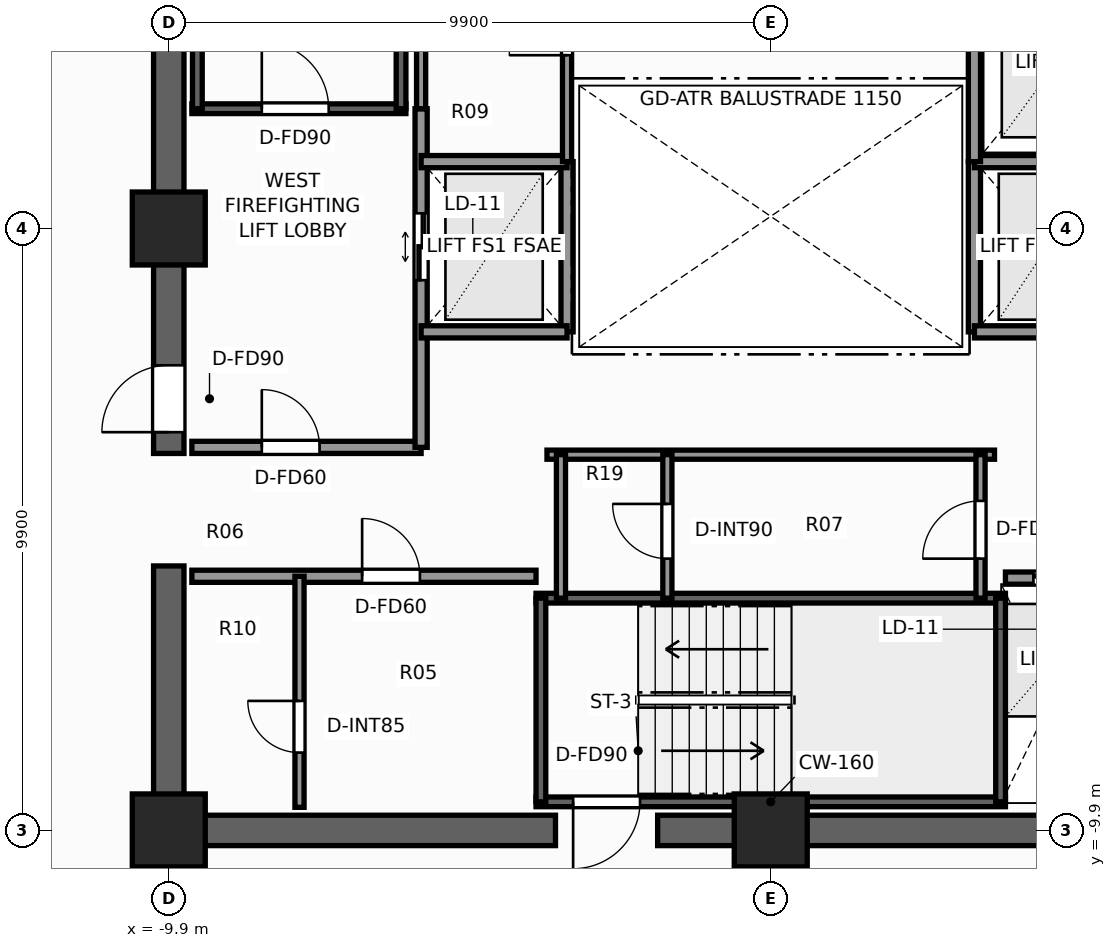
"""IFC4 building model, lengths in metres.
Left out: names, types, materials, properties, quantities, classifications, styles, units other than length and angle.
Written with IfcOpenShell. Run it as: python <this file> out.ifc"""

import sys

from ifc_helpers import new_model, si_unit, direction, frame, frame_2d, origin, origin_2d, place, context, subcontext, project, spatial, rectangle, extrude, element, fill, save


model = new_model("IFC4")
c1 = context("Model", 3, precision=1e-05, world=origin(), true_north=direction((0.0, 1.0)))
c2 = subcontext(c1, "Body", "Model", "MODEL_VIEW")
j1 = project(units=[si_unit("LENGTHUNIT", "METRE"), si_unit("PLANEANGLEUNIT", "RADIAN")], contexts=[c1])
p1 = place(None, origin())
s1 = spatial("IfcSite", under=j1, at=p1, CompositionType="ELEMENT")
p2 = place(p1, origin())
s2 = spatial("IfcBuilding", under=s1, at=p2, CompositionType="ELEMENT")
p3 = place(p2, frame((0.0, 0.0, 173.4)))
s3 = spatial("IfcBuildingStorey", under=s2, at=p3, CompositionType="ELEMENT", Elevation=173.4)
p4 = place(p3, frame((10.15, -9.9, 0.0), z_axis=(0.0, 0.0, 1.0), x_axis=(-1.0, 0.0, 0.0)))
e1 = element("IfcWall", 1, at=p4, inside=s3, PredefinedType="SHEAR", context=c2, shape_type="SweptSolid", body=[
    extrude(rectangle(XDim=12.01, YDim=0.5, at=frame_2d((6.005, 0.0))), origin(), (0.0, 0.0, 1.0), 3.3),
])
p5 = place(p3, frame((-3.54, -9.9, 0.0), z_axis=(0.0, 0.0, 1.0), x_axis=(-1.0, 0.0, 0.0)))
e2 = element("IfcWall", 2, at=p5, inside=s3, PredefinedType="SHEAR", context=c2, shape_type="SweptSolid", body=[
    extrude(rectangle(XDim=6.61, YDim=0.5, at=frame_2d((3.305, 0.0))), origin(), (0.0, 0.0, 1.0), 3.3),
])
p6 = place(p3, frame((-9.9, -9.65, 0.0), z_axis=(0.0, 0.0, 1.0), x_axis=(0.0, 1.0, 0.0)))
e3 = element("IfcWall", 3, at=p6, inside=s3, PredefinedType="SHEAR", context=c2, shape_type="SweptSolid", body=[
    extrude(rectangle(XDim=4.1, YDim=0.5, at=frame_2d((2.05, 0.0))), origin(), (0.0, 0.0, 1.0), 3.3),
])
p7 = place(p3, frame((-9.9, -3.7, 0.0), z_axis=(0.0, 0.0, 1.0), x_axis=(0.0, 1.0, 0.0)))
e4 = element("IfcWall", 4, at=p7, inside=s3, PredefinedType="SHEAR", context=c2, shape_type="SweptSolid", body=[
    extrude(rectangle(XDim=13.35, YDim=0.5, at=frame_2d((6.675, 0.0))), origin(), (0.0, 0.0, 1.0), 3.3),
])
p8 = place(p7, frame((0.35, 0.0, 0.0)))
e5 = element("IfcOpeningElement", 5, at=p8, cuts=e4, PredefinedType="OPENING", context=c2, shape_type="SweptSolid", body=[
    extrude(rectangle(XDim=1.1, YDim=2.2, at=frame_2d((0.55, 1.1))), frame((0.0, 0.26, 0.0), z_axis=(0.0, -1.0, 0.0), x_axis=(1.0, 0.0, 0.0)), (0.0, 0.0, 1.0), 0.52),
])
for number, where, z_axis, x_axis in (
    (6, (-9.9, -9.9, 0.0), (0.0, 0.0, 1.0), (1.0, 0.0, 0.0)),
    (7, (0.0, -9.9, 0.0), (0.0, 0.0, 1.0), (1.0, 0.0, 0.0)),
    (8, (-9.9, 0.0, 0.0), (0.0, 0.0, 1.0), (1.0, 0.0, 0.0)),
):
    element("IfcColumn", number, at=place(p3, frame(where, z_axis=z_axis, x_axis=x_axis)), inside=s3, PredefinedType="COLUMN", context=c2, shape_type="SweptSolid", body=[
        extrude(rectangle(XDim=1.2, YDim=1.2, at=origin_2d()), origin(), (0.0, 0.0, 1.0), 3.3),
    ])
p9 = place(p3, frame((-9.52, 1.97, 0.0), z_axis=(0.0, 0.0, 1.0), x_axis=(1.0, 0.0, 0.0)))
e9 = element("IfcWall", 9, at=p9, inside=s3, PredefinedType="SHEAR", context=c2, shape_type="SweptSolid", body=[
    extrude(rectangle(XDim=3.52, YDim=0.16, at=frame_2d((1.76, 0.0))), origin(), (0.0, 0.0, 1.0), 3.3),
])
p10 = place(p9, frame((1.15, 0.0, 0.0)))
e10 = element("IfcOpeningElement", 10, at=p10, cuts=e9, PredefinedType="OPENING", context=c2, shape_type="SweptSolid", body=[
    extrude(rectangle(XDim=1.1, YDim=2.2, at=frame_2d((0.55, 1.1))), frame((0.0, 0.09, 0.0), z_axis=(0.0, -1.0, 0.0), x_axis=(1.0, 0.0, 0.0)), (0.0, 0.0, 1.0), 0.18),
])
for number, where, z_axis, x_axis in (
    (11, (-9.43, 1.97, 0.0), (0.0, 0.0, 1.0), (0.0, 1.0, 0.0)),
    (12, (-6.08, 1.97, 0.0), (0.0, 0.0, 1.0), (0.0, 1.0, 0.0)),
):
    element("IfcWall", number, at=place(p3, frame(where, z_axis=z_axis, x_axis=x_axis)), inside=s3, PredefinedType="SHEAR", context=c2, shape_type="SweptSolid", body=[
        extrude(rectangle(XDim=7.56, YDim=0.16, at=frame_2d((3.78, 0.0))), origin(), (0.0, 0.0, 1.0), 3.3),
    ])
p11 = place(p3, frame((3.86, -9.43, 0.0), z_axis=(0.0, 0.0, 1.0), x_axis=(-1.0, 0.0, 0.0)))
e13 = element("IfcWall", 13, at=p11, inside=s3, PredefinedType="SHEAR", context=c2, shape_type="SweptSolid", body=[
    extrude(rectangle(XDim=7.72, YDim=0.16, at=frame_2d((3.86, 0.0))), origin(), (0.0, 0.0, 1.0), 3.3),
])
p12 = place(p11, frame((6.01, 0.0, 0.0)))
e14 = element("IfcOpeningElement", 14, at=p12, cuts=e13, PredefinedType="OPENING", context=c2, shape_type="SweptSolid", body=[
    extrude(rectangle(XDim=1.1, YDim=2.2, at=frame_2d((0.55, 1.1))), frame((0.0, 0.09, 0.0), z_axis=(0.0, -1.0, 0.0), x_axis=(1.0, 0.0, 0.0)), (0.0, 0.0, 1.0), 0.18),
])
p13 = place(p3, frame((-3.86, -6.08, 0.0), z_axis=(0.0, 0.0, 1.0), x_axis=(1.0, 0.0, 0.0)))
e15 = element("IfcWall", 15, at=p13, inside=s3, PredefinedType="SHEAR", context=c2, shape_type="SweptSolid", body=[
    extrude(rectangle(XDim=7.72, YDim=0.16, at=frame_2d((3.86, 0.0))), origin(), (0.0, 0.0, 1.0), 3.3),
])
for number, where, z_axis, x_axis in (
    (16, (-3.78, -9.43, 0.0), (0.0, 0.0, 1.0), (0.0, 1.0, 0.0)),
    (17, (3.78, -9.43, 0.0), (0.0, 0.0, 1.0), (0.0, 1.0, 0.0)),
):
    element("IfcWall", number, at=place(p3, frame(where, z_axis=z_axis, x_axis=x_axis)), inside=s3, PredefinedType="SHEAR", context=c2, shape_type="SweptSolid", body=[
        extrude(rectangle(XDim=3.35, YDim=0.16, at=frame_2d((1.675, 0.0))), origin(), (0.0, 0.0, 1.0), 3.3),
    ])
p14 = place(p3, frame((-9.52, -3.6, 0.0), z_axis=(0.0, 0.0, 1.0), x_axis=(1.0, 0.0, 0.0)))
e18 = element("IfcWall", 18, at=p14, inside=s3, PredefinedType="SOLIDWALL", context=c2, shape_type="SweptSolid", body=[
    extrude(rectangle(XDim=3.77, YDim=0.2, at=frame_2d((1.885, 0.0))), origin(), (0.0, 0.0, 1.0), 3.08),
])
p15 = place(p14, frame((1.15, 0.0, 0.0)))
e19 = element("IfcOpeningElement", 19, at=p15, cuts=e18, PredefinedType="OPENING", context=c2, shape_type="SweptSolid", body=[
    extrude(rectangle(XDim=0.95, YDim=2.06, at=frame_2d((0.475, 1.03))), frame((0.0, 0.11, 0.0), z_axis=(0.0, -1.0, 0.0), x_axis=(1.0, 0.0, 0.0)), (0.0, 0.0, 1.0), 0.22),
])
p16 = place(p3, frame((-5.75, -3.6, 0.0), z_axis=(0.0, 0.0, 1.0), x_axis=(0.0, 1.0, 0.0)))
e20 = element("IfcWall", 20, at=p16, inside=s3, PredefinedType="SOLIDWALL", context=c2, shape_type="SweptSolid", body=[
    extrude(rectangle(XDim=5.57, YDim=0.2, at=frame_2d((2.785, 0.0))), origin(), (0.0, 0.0, 1.0), 2.715),
])
p17 = place(p16, frame((2.75, 0.0, 0.0)))
e21 = element("IfcOpeningElement", 21, at=p17, cuts=e20, PredefinedType="OPENING", context=c2, shape_type="SweptSolid", body=[
    extrude(rectangle(XDim=1.1, YDim=2.2, at=frame_2d((0.55, 1.1))), frame((0.0, 0.11, 0.0), z_axis=(0.0, -1.0, 0.0), x_axis=(1.0, 0.0, 0.0)), (0.0, 0.0, 1.0), 0.22),
])
p18 = place(p3, frame((-3.35, -1.7, 0.0), z_axis=(0.0, 0.0, 1.0), x_axis=(0.0, 1.0, 0.0)))
e22 = element("IfcWall", 22, at=p18, inside=s3, PredefinedType="SOLIDWALL", context=c2, shape_type="SweptSolid", body=[
    extrude(rectangle(XDim=2.8, YDim=0.2, at=frame_2d((1.4, 0.0))), origin(), (0.0, 0.0, 1.0), 2.715),
])
for number, where, z_axis, x_axis in (
    (23, (-5.75, -1.7, 0.0), (0.0, 0.0, 1.0), (1.0, 0.0, 0.0)),
    (24, (-5.75, 1.1, 0.0), (0.0, 0.0, 1.0), (1.0, 0.0, 0.0)),
):
    element("IfcWall", number, at=place(p3, frame(where, z_axis=z_axis, x_axis=x_axis)), inside=s3, PredefinedType="SOLIDWALL", context=c2, shape_type="SweptSolid", body=[
        extrude(rectangle(XDim=2.4, YDim=0.2, at=frame_2d((1.2, 0.0))), origin(), (0.0, 0.0, 1.0), 3.08),
    ])
p19 = place(p3, frame((3.35, -1.7, 0.0), z_axis=(0.0, 0.0, 1.0), x_axis=(0.0, 1.0, 0.0)))
e25 = element("IfcWall", 25, at=p19, inside=s3, PredefinedType="SOLIDWALL", context=c2, shape_type="SweptSolid", body=[
    extrude(rectangle(XDim=2.8, YDim=0.2, at=frame_2d((1.4, 0.0))), origin(), (0.0, 0.0, 1.0), 2.715),
])
for number, where, z_axis, x_axis in (
    (26, (3.35, -1.7, 0.0), (0.0, 0.0, 1.0), (1.0, 0.0, 0.0)),
    (27, (3.35, 1.1, 0.0), (0.0, 0.0, 1.0), (1.0, 0.0, 0.0)),
):
    element("IfcWall", number, at=place(p3, frame(where, z_axis=z_axis, x_axis=x_axis)), inside=s3, PredefinedType="SOLIDWALL", context=c2, shape_type="SweptSolid", body=[
        extrude(rectangle(XDim=2.4, YDim=0.2, at=frame_2d((1.2, 0.0))), origin(), (0.0, 0.0, 1.0), 3.08),
    ])
p20 = place(p3, frame((3.35, 1.1, 0.0), z_axis=(0.0, 0.0, 1.0), x_axis=(0.0, 1.0, 0.0)))
e28 = element("IfcWall", 28, at=p20, inside=s3, PredefinedType="SOLIDWALL", context=c2, shape_type="SweptSolid", body=[
    extrude(rectangle(XDim=3.2, YDim=0.2, at=frame_2d((1.6, 0.0))), origin(), (0.0, 0.0, 1.0), 2.715),
])
p21 = place(p3, frame((-9.52, -5.72, 0.0), z_axis=(0.0, 0.0, 1.0), x_axis=(1.0, 0.0, 0.0)))
e29 = element("IfcWall", 29, at=p21, inside=s3, PredefinedType="SOLIDWALL", context=c2, shape_type="SweptSolid", body=[
    extrude(rectangle(XDim=5.66, YDim=0.2, at=frame_2d((2.83, 0.0))), origin(), (0.0, 0.0, 1.0), 3.08),
])
p22 = place(p21, frame((2.8, 0.0, 0.0)))
e30 = element("IfcOpeningElement", 30, at=p22, cuts=e29, PredefinedType="OPENING", context=c2, shape_type="SweptSolid", body=[
    extrude(rectangle(XDim=0.95, YDim=2.06, at=frame_2d((0.475, 1.03))), frame((0.0, 0.11, 0.0), z_axis=(0.0, -1.0, 0.0), x_axis=(1.0, 0.0, 0.0)), (0.0, 0.0, 1.0), 0.22),
])
p23 = place(p3, frame((-7.75, -9.52, 0.0), z_axis=(0.0, 0.0, 1.0), x_axis=(0.0, 1.0, 0.0)))
e31 = element("IfcWall", 31, at=p23, inside=s3, PredefinedType="PARTITIONING", context=c2, shape_type="SweptSolid", body=[
    extrude(rectangle(XDim=3.8, YDim=0.15, at=frame_2d((1.9, 0.0))), origin(), (0.0, 0.0, 1.0), 3.08),
])
p24 = place(p23, frame((0.9, 0.0, 0.0)))
e32 = element("IfcOpeningElement", 32, at=p24, cuts=e31, PredefinedType="OPENING", context=c2, shape_type="SweptSolid", body=[
    extrude(rectangle(XDim=0.85, YDim=2.03, at=frame_2d((0.425, 1.015))), frame((0.0, 0.085, 0.0), z_axis=(0.0, -1.0, 0.0), x_axis=(1.0, 0.0, 0.0)), (0.0, 0.0, 1.0), 0.17),
])
p25 = place(p3, frame((3.86, -5.75, 0.0), z_axis=(0.0, 0.0, 1.0), x_axis=(1.0, 0.0, 0.0)))
e33 = element("IfcWall", 33, at=p25, inside=s3, PredefinedType="SOLIDWALL", context=c2, shape_type="SweptSolid", body=[
    extrude(rectangle(XDim=5.66, YDim=0.2, at=frame_2d((2.83, 0.0))), origin(), (0.0, 0.0, 1.0), 3.08),
])
p26 = place(p25, frame((0.46, 0.0, 0.0)))
e34 = element("IfcOpeningElement", 34, at=p26, cuts=e33, PredefinedType="OPENING", context=c2, shape_type="SweptSolid", body=[
    extrude(rectangle(XDim=1.1, YDim=2.2, at=frame_2d((0.55, 1.1))), frame((0.0, 0.11, 0.0), z_axis=(0.0, -1.0, 0.0), x_axis=(1.0, 0.0, 0.0)), (0.0, 0.0, 1.0), 0.22),
])
p27 = place(p25, frame((2.39, 0.0, 0.0)))
e35 = element("IfcOpeningElement", 35, at=p27, cuts=e33, PredefinedType="OPENING", context=c2, shape_type="SweptSolid", body=[
    extrude(rectangle(XDim=1.1, YDim=2.2, at=frame_2d((0.55, 1.1))), frame((0.0, 0.11, 0.0), z_axis=(0.0, -1.0, 0.0), x_axis=(1.0, 0.0, 0.0)), (0.0, 0.0, 1.0), 0.22),
])
p28 = place(p25, frame((4.32, 0.0, 0.0)))
e36 = element("IfcOpeningElement", 36, at=p28, cuts=e33, PredefinedType="OPENING", context=c2, shape_type="SweptSolid", body=[
    extrude(rectangle(XDim=1.1, YDim=2.2, at=frame_2d((0.55, 1.1))), frame((0.0, 0.11, 0.0), z_axis=(0.0, -1.0, 0.0), x_axis=(1.0, 0.0, 0.0)), (0.0, 0.0, 1.0), 0.22),
])
p29 = place(p3, frame((-3.68, -3.72, 0.0), z_axis=(0.0, 0.0, 1.0), x_axis=(1.0, 0.0, 0.0)))
e37 = element("IfcWall", 37, at=p29, inside=s3, PredefinedType="PARTITIONING", context=c2, shape_type="SweptSolid", body=[
    extrude(rectangle(XDim=7.36, YDim=0.15, at=frame_2d((3.68, 0.0))), origin(), (0.0, 0.0, 1.0), 3.08),
])
p30 = place(p3, frame((3.45, -6.08, 0.0), z_axis=(0.0, 0.0, 1.0), x_axis=(0.0, 1.0, 0.0)))
e38 = element("IfcWall", 38, at=p30, inside=s3, PredefinedType="PARTITIONING", context=c2, shape_type="SweptSolid", body=[
    extrude(rectangle(XDim=2.36, YDim=0.15, at=frame_2d((1.18, 0.0))), origin(), (0.0, 0.0, 1.0), 3.08),
])
p31 = place(p30, frame((0.65, 0.0, 0.0)))
e39 = element("IfcOpeningElement", 39, at=p31, cuts=e38, PredefinedType="OPENING", context=c2, shape_type="SweptSolid", body=[
    extrude(rectangle(XDim=0.95, YDim=2.06, at=frame_2d((0.475, 1.03))), frame((0.0, 0.085, 0.0), z_axis=(0.0, -1.0, 0.0), x_axis=(1.0, 0.0, 0.0)), (0.0, 0.0, 1.0), 0.17),
])
p32 = place(p3, frame((-3.45, -6.08, 0.0), z_axis=(0.0, 0.0, 1.0), x_axis=(0.0, 1.0, 0.0)))
e40 = element("IfcWall", 40, at=p32, inside=s3, PredefinedType="PARTITIONING", context=c2, shape_type="SweptSolid", body=[
    extrude(rectangle(XDim=2.36, YDim=0.15, at=frame_2d((1.18, 0.0))), origin(), (0.0, 0.0, 1.0), 3.08),
])
p33 = place(p3, frame((-1.7, -6.08, 0.0), z_axis=(0.0, 0.0, 1.0), x_axis=(0.0, 1.0, 0.0)))
e41 = element("IfcWall", 41, at=p33, inside=s3, PredefinedType="PARTITIONING", context=c2, shape_type="SweptSolid", body=[
    extrude(rectangle(XDim=2.36, YDim=0.15, at=frame_2d((1.18, 0.0))), origin(), (0.0, 0.0, 1.0), 3.08),
])
p34 = place(p33, frame((0.65, 0.0, 0.0)))
e42 = element("IfcOpeningElement", 42, at=p34, cuts=e41, PredefinedType="OPENING", context=c2, shape_type="SweptSolid", body=[
    extrude(rectangle(XDim=0.9, YDim=2.06, at=frame_2d((0.45, 1.03))), frame((0.0, 0.085, 0.0), z_axis=(0.0, -1.0, 0.0), x_axis=(1.0, 0.0, 0.0)), (0.0, 0.0, 1.0), 0.17),
])
p35 = place(p3, frame((-3.35, 1.1, 0.0), z_axis=(0.0, 0.0, 1.0), x_axis=(0.0, 1.0, 0.0)))
e43 = element("IfcWall", 43, at=p35, inside=s3, PredefinedType="PARTITIONING", context=c2, shape_type="SweptSolid", body=[
    extrude(rectangle(XDim=3.2, YDim=0.15, at=frame_2d((1.6, 0.0))), origin(), (0.0, 0.0, 1.0), 2.715),
])
p36 = place(p35, frame((1.75, 0.0, 0.0)))
e44 = element("IfcOpeningElement", 44, at=p36, cuts=e43, PredefinedType="OPENING", context=c2, shape_type="SweptSolid", body=[
    extrude(rectangle(XDim=0.95, YDim=2.06, at=frame_2d((0.475, 1.03))), frame((0.0, 0.085, 0.0), z_axis=(0.0, -1.0, 0.0), x_axis=(1.0, 0.0, 0.0)), (0.0, 0.0, 1.0), 0.17),
])
p37 = place(p3, frame((-5.75, 1.97, 0.0), z_axis=(0.0, 0.0, 1.0), x_axis=(0.0, 1.0, 0.0)))
e45 = element("IfcWall", 45, at=p37, inside=s3, PredefinedType="PARTITIONING", context=c2, shape_type="SweptSolid", body=[
    extrude(rectangle(XDim=2.33, YDim=0.15, at=frame_2d((1.165, 0.0))), origin(), (0.0, 0.0, 1.0), 2.715),
])
p38 = place(p10, origin())
e46 = element("IfcDoor", 46, at=p38, inside=s3, OperationType="SINGLE_SWING_LEFT", PredefinedType="DOOR", context=c2, shape_type="SweptSolid", body=[
    extrude(rectangle(XDim=1.1, YDim=2.2, at=frame_2d((0.55, 1.1))), frame((0.0, 0.025, 0.0), z_axis=(0.0, -1.0, 0.0), x_axis=(1.0, 0.0, 0.0)), (0.0, 0.0, 1.0), 0.05),
])
fill(e10, e46)
p39 = place(p12, origin())
e47 = element("IfcDoor", 47, at=p39, inside=s3, OperationType="SINGLE_SWING_RIGHT", PredefinedType="DOOR", context=c2, shape_type="SweptSolid", body=[
    extrude(rectangle(XDim=1.1, YDim=2.2, at=frame_2d((0.55, 1.1))), frame((0.0, 0.025, 0.0), z_axis=(0.0, -1.0, 0.0), x_axis=(1.0, 0.0, 0.0)), (0.0, 0.0, 1.0), 0.05),
])
fill(e14, e47)
p40 = place(p8, origin())
e48 = element("IfcDoor", 48, at=p40, inside=s3, OperationType="SINGLE_SWING_LEFT", PredefinedType="DOOR", context=c2, shape_type="SweptSolid", body=[
    extrude(rectangle(XDim=1.1, YDim=2.2, at=frame_2d((0.55, 1.1))), frame((0.0, 0.025, 0.0), z_axis=(0.0, -1.0, 0.0), x_axis=(1.0, 0.0, 0.0)), (0.0, 0.0, 1.0), 0.05),
])
fill(e5, e48)
p41 = place(p17, origin())
e49 = element("IfcDoor", 49, at=p41, inside=s3, OperationType="DOUBLE_DOOR_SLIDING", PredefinedType="DOOR", context=c2, shape_type="SweptSolid", body=[
    extrude(rectangle(XDim=1.1, YDim=2.2, at=frame_2d((0.55, 1.1))), frame((0.0, 0.025, 0.0), z_axis=(0.0, -1.0, 0.0), x_axis=(1.0, 0.0, 0.0)), (0.0, 0.0, 1.0), 0.05),
])
fill(e21, e49)
p42 = place(p22, origin())
e50 = element("IfcDoor", 50, at=p42, inside=s3, OperationType="SINGLE_SWING_LEFT", PredefinedType="DOOR", context=c2, shape_type="SweptSolid", body=[
    extrude(rectangle(XDim=0.95, YDim=2.06, at=frame_2d((0.475, 1.03))), frame((0.0, 0.025, 0.0), z_axis=(0.0, -1.0, 0.0), x_axis=(1.0, 0.0, 0.0)), (0.0, 0.0, 1.0), 0.05),
])
fill(e30, e50)
p43 = place(p24, origin())
e51 = element("IfcDoor", 51, at=p43, inside=s3, OperationType="SINGLE_SWING_RIGHT", PredefinedType="DOOR", context=c2, shape_type="SweptSolid", body=[
    extrude(rectangle(XDim=0.85, YDim=2.03, at=frame_2d((0.425, 1.015))), frame((0.0, 0.025, 0.0), z_axis=(0.0, -1.0, 0.0), x_axis=(1.0, 0.0, 0.0)), (0.0, 0.0, 1.0), 0.05),
])
fill(e32, e51)
p44 = place(p15, origin())
e52 = element("IfcDoor", 52, at=p44, inside=s3, OperationType="SINGLE_SWING_LEFT", PredefinedType="DOOR", context=c2, shape_type="SweptSolid", body=[
    extrude(rectangle(XDim=0.95, YDim=2.06, at=frame_2d((0.475, 1.03))), frame((0.0, 0.025, 0.0), z_axis=(0.0, -1.0, 0.0), x_axis=(1.0, 0.0, 0.0)), (0.0, 0.0, 1.0), 0.05),
])
fill(e19, e52)
p45 = place(p26, origin())
e53 = element("IfcDoor", 53, at=p45, inside=s3, OperationType="DOUBLE_DOOR_SLIDING", PredefinedType="DOOR", context=c2, shape_type="SweptSolid", body=[
    extrude(rectangle(XDim=1.1, YDim=2.2, at=frame_2d((0.55, 1.1))), frame((0.0, 0.025, 0.0), z_axis=(0.0, -1.0, 0.0), x_axis=(1.0, 0.0, 0.0)), (0.0, 0.0, 1.0), 0.05),
])
fill(e34, e53)
p46 = place(p31, origin())
e54 = element("IfcDoor", 54, at=p46, inside=s3, OperationType="SINGLE_SWING_LEFT", PredefinedType="DOOR", context=c2, shape_type="SweptSolid", body=[
    extrude(rectangle(XDim=0.95, YDim=2.06, at=frame_2d((0.475, 1.03))), frame((0.0, 0.025, 0.0), z_axis=(0.0, -1.0, 0.0), x_axis=(1.0, 0.0, 0.0)), (0.0, 0.0, 1.0), 0.05),
])
fill(e39, e54)
p47 = place(p34, origin())
e55 = element("IfcDoor", 55, at=p47, inside=s3, OperationType="SINGLE_SWING_RIGHT", PredefinedType="DOOR", context=c2, shape_type="SweptSolid", body=[
    extrude(rectangle(XDim=0.9, YDim=2.06, at=frame_2d((0.45, 1.03))), frame((0.0, 0.025, 0.0), z_axis=(0.0, -1.0, 0.0), x_axis=(1.0, 0.0, 0.0)), (0.0, 0.0, 1.0), 0.05),
])
fill(e42, e55)
p48 = place(p36, origin())
e56 = element("IfcDoor", 56, at=p48, inside=s3, OperationType="SINGLE_SWING_LEFT", PredefinedType="DOOR", context=c2, shape_type="SweptSolid", body=[
    extrude(rectangle(XDim=0.95, YDim=2.06, at=frame_2d((0.475, 1.03))), frame((0.0, 0.025, 0.0), z_axis=(0.0, -1.0, 0.0), x_axis=(1.0, 0.0, 0.0)), (0.0, 0.0, 1.0), 0.05),
])
fill(e44, e56)
save(model, sys.argv[1])
